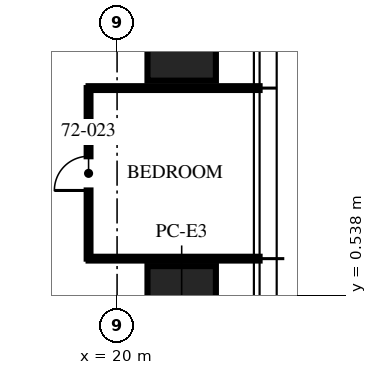
"""IFC4 building model, lengths in metres.
Left out: names, types, materials, properties, quantities, classifications, styles, units other than length and angle.
Written with IfcOpenShell. Run it as: python <this file> out.ifc"""

import sys

from ifc_helpers import new_model, si_unit, direction, frame, frame_2d, origin, origin_2d, place, context, subcontext, project, spatial, rectangle, extrude, element, fill, save


model = new_model("IFC4")
c1 = context("Model", 3, precision=1e-05, world=origin(), true_north=direction((0.0, 1.0)))
c2 = subcontext(c1, "Body", "Model", "MODEL_VIEW")
j1 = project(units=[si_unit("LENGTHUNIT", "METRE"), si_unit("PLANEANGLEUNIT", "RADIAN")], contexts=[c1])
p1 = place(None, origin())
s1 = spatial("IfcSite", under=j1, at=p1, CompositionType="ELEMENT")
p2 = place(p1, origin())
s2 = spatial("IfcBuilding", under=s1, at=p2, CompositionType="ELEMENT")
p3 = place(p2, frame((0.0, 0.0, 289.5)))
s3 = spatial("IfcBuildingStorey", under=s2, at=p3, CompositionType="ELEMENT", Elevation=289.5)
for number, where, z_axis, x_axis in (
    (1, (21.7, 7.48, 0.0), (0.0, 0.0, 1.0), (0.0, 1.0, 0.0)),
    (2, (21.7, 0.0, 0.0), (0.0, 0.0, 1.0), (0.0, 1.0, 0.0)),
):
    element("IfcColumn", number, at=place(p3, frame(where, z_axis=z_axis, x_axis=x_axis)), inside=s3, PredefinedType="COLUMN", context=c2, shape_type="SweptSolid", body=[
        extrude(rectangle(XDim=2.6, YDim=1.8, at=origin_2d()), origin(), (0.0, 0.0, 1.0), 3.75),
    ])
for number, where, z_axis, x_axis in (
    (3, (19.25, 1.496, 0.0), (0.0, 0.0, 1.0), (1.0, 0.0, 0.0)),
    (4, (19.25, 5.984, 0.0), (0.0, 0.0, 1.0), (1.0, 0.0, 0.0)),
):
    element("IfcWall", number, at=place(p3, frame(where, z_axis=z_axis, x_axis=x_axis)), inside=s3, PredefinedType="PARTITIONING", context=c2, shape_type="SweptSolid", body=[
        extrude(rectangle(XDim=4.5, YDim=0.1, at=frame_2d((2.25, 0.0))), origin(), (0.0, 0.0, 1.0), 3.01),
    ])
p4 = place(p3, frame((19.25, 1.496, 0.0), z_axis=(0.0, 0.0, 1.0), x_axis=(0.0, 1.0, 0.0)))
e5 = element("IfcWall", 5, at=p4, inside=s3, PredefinedType="PARTITIONING", context=c2, shape_type="SweptSolid", body=[
    extrude(rectangle(XDim=4.488, YDim=0.1, at=frame_2d((2.244, 0.0))), origin(), (0.0, 0.0, 1.0), 2.91),
])
p5 = place(p4, frame((1.794, 0.0, 0.0)))
e6 = element("IfcOpeningElement", 6, at=p5, cuts=e5, PredefinedType="OPENING", context=c2, shape_type="SweptSolid", body=[
    extrude(rectangle(XDim=0.9, YDim=2.1, at=frame_2d((0.45, 1.05))), frame((0.0, 0.06, 0.0), z_axis=(0.0, -1.0, 0.0), x_axis=(1.0, 0.0, 0.0)), (0.0, 0.0, 1.0), 0.12),
])
p6 = place(p5, origin())
e7 = element("IfcDoor", 7, at=p6, inside=s3, OperationType="SINGLE_SWING_LEFT", PredefinedType="DOOR", context=c2, shape_type="SweptSolid", body=[
    extrude(rectangle(XDim=0.9, YDim=2.1, at=frame_2d((0.45, 1.05))), frame((0.0, 0.025, 0.0), z_axis=(0.0, -1.0, 0.0), x_axis=(1.0, 0.0, 0.0)), (0.0, 0.0, 1.0), 0.05),
])
fill(e6, e7)
save(model, sys.argv[1])
